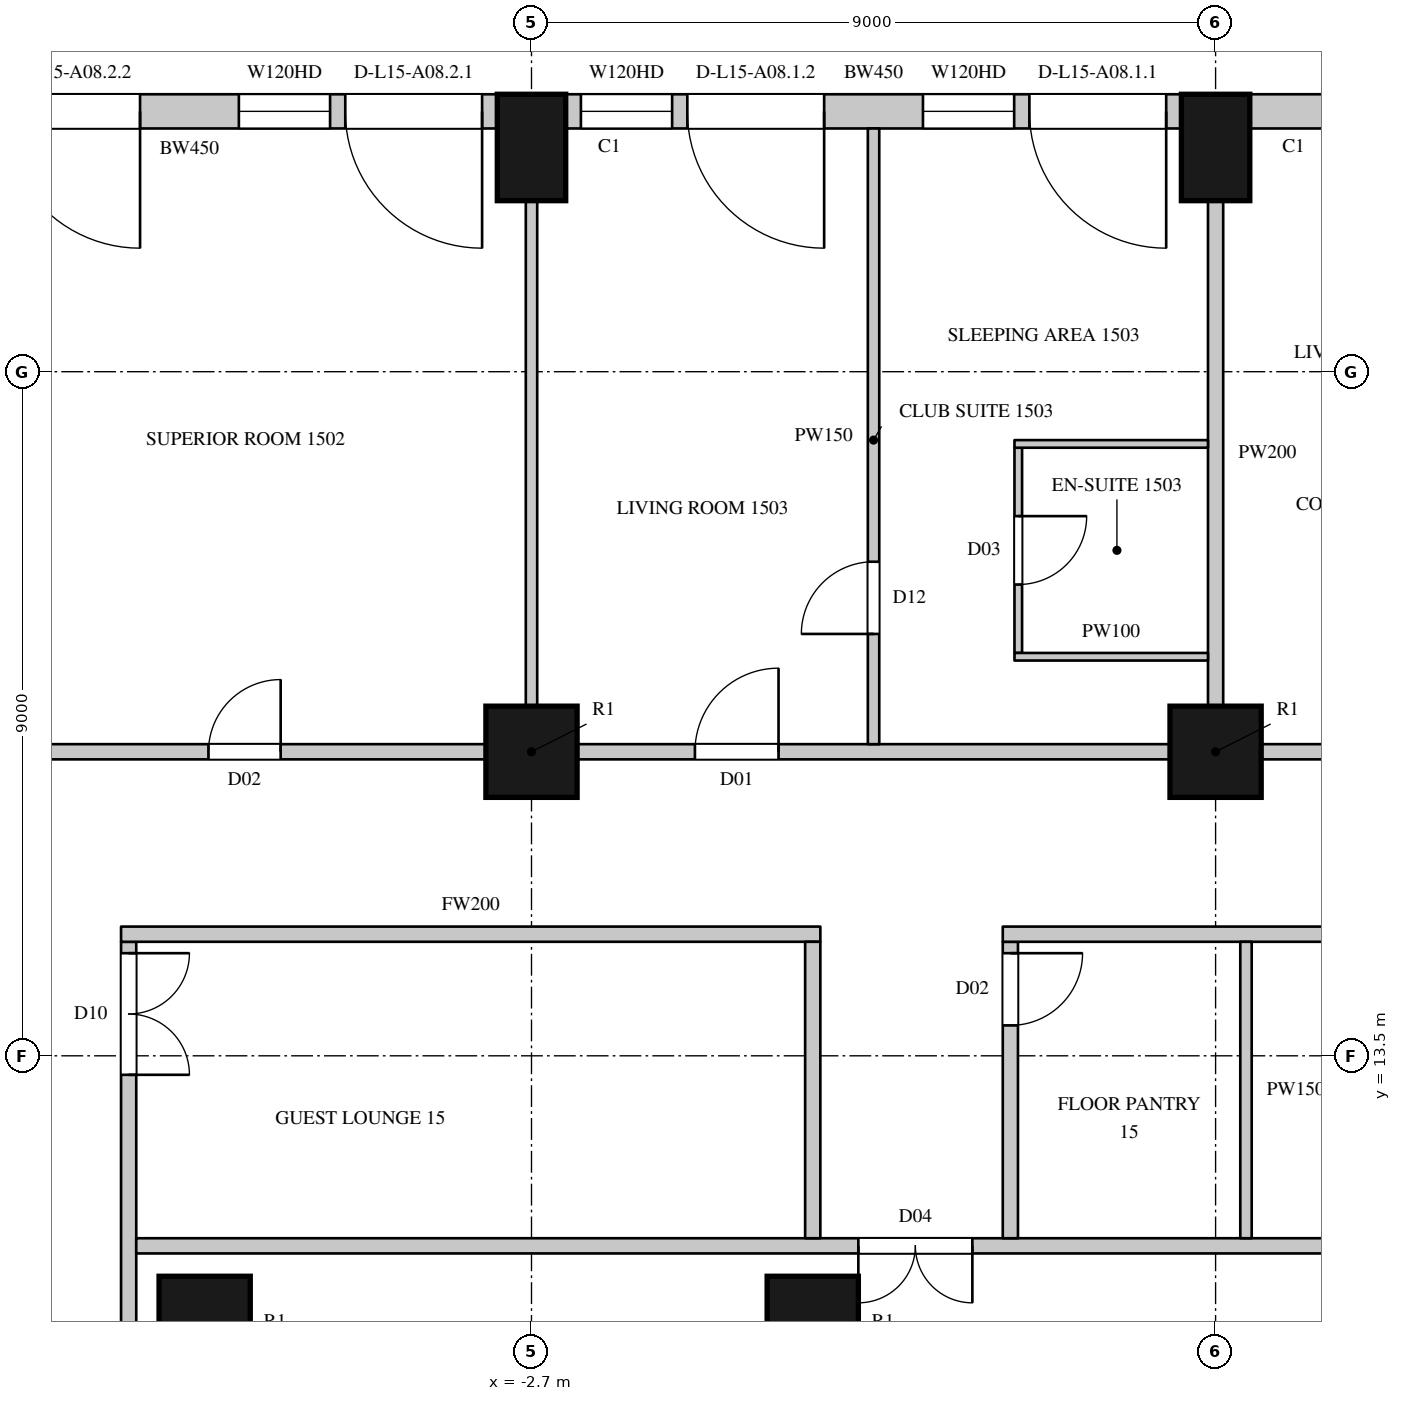
"""IFC4 building model, lengths in metres.
Left out: names, types, materials, properties, quantities, classifications, styles, units other than length and angle.
Written with IfcOpenShell. Run it as: python <this file> out.ifc"""

import sys

from ifc_helpers import new_model, si_unit, direction, frame, frame_2d, origin, origin_2d, place, context, subcontext, project, spatial, rectangle, circle, extrude, element, fill, save


model = new_model("IFC4")
c1 = context("Model", 3, precision=1e-05, world=origin(), true_north=direction((0.0, 1.0)))
c2 = subcontext(c1, "Body", "Model", "MODEL_VIEW")
j1 = project(units=[si_unit("LENGTHUNIT", "METRE"), si_unit("PLANEANGLEUNIT", "RADIAN")], contexts=[c1])
p1 = place(None, origin())
s1 = spatial("IfcSite", under=j1, at=p1, CompositionType="ELEMENT")
p2 = place(p1, origin())
s2 = spatial("IfcBuilding", under=s1, at=p2, CompositionType="ELEMENT")
p3 = place(p2, frame((0.0, 0.0, 84.3)))
s3 = spatial("IfcBuildingStorey", under=s2, at=p3, CompositionType="ELEMENT", Elevation=84.3)
for number, where, z_axis, x_axis in (
    (1, (6.3, 25.45, 0.0), (0.0, 0.0, 1.0), (-1.0, 0.0, 0.0)),
    (2, (-2.7, 25.45, 0.0), (0.0, 0.0, 1.0), (-1.0, 0.0, 0.0)),
):
    element("IfcColumn", number, at=place(p3, frame(where, z_axis=z_axis, x_axis=x_axis)), inside=s3, PredefinedType="COLUMN", context=c2, shape_type="SweptSolid", body=[
        extrude(rectangle(XDim=0.9, YDim=1.4, at=origin_2d()), origin(), (0.0, 0.0, 1.0), 3.6),
    ])
for number, where, z_axis, x_axis in (
    (3, (-2.7, 17.5, 0.0), (0.0, 0.0, 1.0), (1.0, 0.0, 0.0)),
    (4, (6.3, 17.5, 0.0), (0.0, 0.0, 1.0), (1.0, 0.0, 0.0)),
    (5, (-7.0, 10.0, 0.0), (0.0, 0.0, 1.0), (1.0, 0.0, 0.0)),
    (6, (1.0, 10.0, 0.0), (0.0, 0.0, 1.0), (1.0, 0.0, 0.0)),
):
    element("IfcColumn", number, at=place(p3, frame(where, z_axis=z_axis, x_axis=x_axis)), inside=s3, PredefinedType="COLUMN", context=c2, shape_type="SweptSolid", body=[
        extrude(circle(Radius=0.6, at=origin_2d()), origin(), (0.0, 0.0, 1.0), 3.6),
    ])
p4 = place(p3, frame((11.989, 25.925, 0.0), z_axis=(0.0, 0.0, 1.0), x_axis=(-1.0, 0.0, 0.0)))
e7 = element("IfcWall", 7, at=p4, inside=s3, PredefinedType="SOLIDWALL", context=c2, shape_type="SweptSolid", body=[
    extrude(rectangle(XDim=5.239, YDim=0.45, at=frame_2d((2.619, 0.0))), origin(), (0.0, 0.0, 1.0), 3.3),
])
p5 = place(p4, frame((1.77, 0.0, 1.05)))
e8 = element("IfcOpeningElement", 8, at=p5, cuts=e7, PredefinedType="OPENING", context=c2, shape_type="SweptSolid", body=[
    extrude(rectangle(XDim=2.1, YDim=2.0, at=frame_2d((1.05, 1.0))), frame((0.0, 0.235, 0.0), z_axis=(0.0, -1.0, 0.0), x_axis=(1.0, 0.0, 0.0)), (0.0, 0.0, 1.0), 0.47),
])
p6 = place(p3, frame((5.85, 25.925, 0.0), z_axis=(0.0, 0.0, 1.0), x_axis=(-1.0, 0.0, 0.0)))
e9 = element("IfcWall", 9, at=p6, inside=s3, PredefinedType="SOLIDWALL", context=c2, shape_type="SweptSolid", body=[
    extrude(rectangle(XDim=8.1, YDim=0.45, at=frame_2d((4.05, 0.0))), origin(), (0.0, 0.0, 1.0), 3.3),
])
p7 = place(p6, frame((0.2, 0.0, 0.0)))
e10 = element("IfcOpeningElement", 10, at=p7, cuts=e9, PredefinedType="OPENING", context=c2, shape_type="SweptSolid", body=[
    extrude(rectangle(XDim=1.8, YDim=2.4, at=frame_2d((0.9, 1.2))), frame((0.0, 0.235, 0.0), z_axis=(0.0, -1.0, 0.0), x_axis=(1.0, 0.0, 0.0)), (0.0, 0.0, 1.0), 0.47),
])
p8 = place(p6, frame((2.2, 0.0, 1.05)))
e11 = element("IfcOpeningElement", 11, at=p8, cuts=e9, PredefinedType="OPENING", context=c2, shape_type="SweptSolid", body=[
    extrude(rectangle(XDim=1.2, YDim=2.0, at=frame_2d((0.6, 1.0))), frame((0.0, 0.235, 0.0), z_axis=(0.0, -1.0, 0.0), x_axis=(1.0, 0.0, 0.0)), (0.0, 0.0, 1.0), 0.47),
])
p9 = place(p6, frame((4.7, 0.0, 0.0)))
e12 = element("IfcOpeningElement", 12, at=p9, cuts=e9, PredefinedType="OPENING", context=c2, shape_type="SweptSolid", body=[
    extrude(rectangle(XDim=1.8, YDim=2.4, at=frame_2d((0.9, 1.2))), frame((0.0, 0.235, 0.0), z_axis=(0.0, -1.0, 0.0), x_axis=(1.0, 0.0, 0.0)), (0.0, 0.0, 1.0), 0.47),
])
p10 = place(p6, frame((6.7, 0.0, 1.05)))
e13 = element("IfcOpeningElement", 13, at=p10, cuts=e9, PredefinedType="OPENING", context=c2, shape_type="SweptSolid", body=[
    extrude(rectangle(XDim=1.2, YDim=2.0, at=frame_2d((0.6, 1.0))), frame((0.0, 0.235, 0.0), z_axis=(0.0, -1.0, 0.0), x_axis=(1.0, 0.0, 0.0)), (0.0, 0.0, 1.0), 0.47),
])
p11 = place(p3, frame((-3.15, 25.925, 0.0), z_axis=(0.0, 0.0, 1.0), x_axis=(-1.0, 0.0, 0.0)))
e14 = element("IfcWall", 14, at=p11, inside=s3, PredefinedType="SOLIDWALL", context=c2, shape_type="SweptSolid", body=[
    extrude(rectangle(XDim=8.1, YDim=0.45, at=frame_2d((4.05, 0.0))), origin(), (0.0, 0.0, 1.0), 3.3),
])
p12 = place(p11, frame((0.2, 0.0, 0.0)))
e15 = element("IfcOpeningElement", 15, at=p12, cuts=e14, PredefinedType="OPENING", context=c2, shape_type="SweptSolid", body=[
    extrude(rectangle(XDim=1.8, YDim=2.4, at=frame_2d((0.9, 1.2))), frame((0.0, 0.235, 0.0), z_axis=(0.0, -1.0, 0.0), x_axis=(1.0, 0.0, 0.0)), (0.0, 0.0, 1.0), 0.47),
])
p13 = place(p11, frame((2.2, 0.0, 1.05)))
e16 = element("IfcOpeningElement", 16, at=p13, cuts=e14, PredefinedType="OPENING", context=c2, shape_type="SweptSolid", body=[
    extrude(rectangle(XDim=1.2, YDim=2.0, at=frame_2d((0.6, 1.0))), frame((0.0, 0.235, 0.0), z_axis=(0.0, -1.0, 0.0), x_axis=(1.0, 0.0, 0.0)), (0.0, 0.0, 1.0), 0.47),
])
p14 = place(p11, frame((4.7, 0.0, 0.0)))
e17 = element("IfcOpeningElement", 17, at=p14, cuts=e14, PredefinedType="OPENING", context=c2, shape_type="SweptSolid", body=[
    extrude(rectangle(XDim=1.8, YDim=2.4, at=frame_2d((0.9, 1.2))), frame((0.0, 0.235, 0.0), z_axis=(0.0, -1.0, 0.0), x_axis=(1.0, 0.0, 0.0)), (0.0, 0.0, 1.0), 0.47),
])
p15 = place(p11, frame((6.7, 0.0, 1.05)))
e18 = element("IfcOpeningElement", 18, at=p15, cuts=e14, PredefinedType="OPENING", context=c2, shape_type="SweptSolid", body=[
    extrude(rectangle(XDim=1.2, YDim=2.0, at=frame_2d((0.6, 1.0))), frame((0.0, 0.235, 0.0), z_axis=(0.0, -1.0, 0.0), x_axis=(1.0, 0.0, 0.0)), (0.0, 0.0, 1.0), 0.47),
])
p16 = place(p3, frame((-11.1, 17.5, 0.0), z_axis=(0.0, 0.0, 1.0), x_axis=(1.0, 0.0, 0.0)))
e19 = element("IfcWall", 19, at=p16, inside=s3, PredefinedType="PARTITIONING", context=c2, shape_type="SweptSolid", body=[
    extrude(rectangle(XDim=7.8, YDim=0.2, at=frame_2d((3.9, 0.0))), origin(), (0.0, 0.0, 1.0), 2.75),
])
p17 = place(p16, frame((4.15, 0.0, 0.0)))
e20 = element("IfcOpeningElement", 20, at=p17, cuts=e19, PredefinedType="OPENING", context=c2, shape_type="SweptSolid", body=[
    extrude(rectangle(XDim=0.95, YDim=2.2, at=frame_2d((0.475, 1.1))), frame((0.0, 0.11, 0.0), z_axis=(0.0, -1.0, 0.0), x_axis=(1.0, 0.0, 0.0)), (0.0, 0.0, 1.0), 0.22),
])
p18 = place(p3, frame((-2.1, 17.5, 0.0), z_axis=(0.0, 0.0, 1.0), x_axis=(1.0, 0.0, 0.0)))
e21 = element("IfcWall", 21, at=p18, inside=s3, PredefinedType="PARTITIONING", context=c2, shape_type="SweptSolid", body=[
    extrude(rectangle(XDim=7.8, YDim=0.2, at=frame_2d((3.9, 0.0))), origin(), (0.0, 0.0, 1.0), 2.75),
])
p19 = place(p18, frame((1.55, 0.0, 0.0)))
e22 = element("IfcOpeningElement", 22, at=p19, cuts=e21, PredefinedType="OPENING", context=c2, shape_type="SweptSolid", body=[
    extrude(rectangle(XDim=1.1, YDim=2.4, at=frame_2d((0.55, 1.2))), frame((0.0, 0.11, 0.0), z_axis=(0.0, -1.0, 0.0), x_axis=(1.0, 0.0, 0.0)), (0.0, 0.0, 1.0), 0.22),
])
p20 = place(p3, frame((6.9, 17.5, 0.0), z_axis=(0.0, 0.0, 1.0), x_axis=(1.0, 0.0, 0.0)))
e23 = element("IfcWall", 23, at=p20, inside=s3, PredefinedType="PARTITIONING", context=c2, shape_type="SweptSolid", body=[
    extrude(rectangle(XDim=7.8, YDim=0.2, at=frame_2d((3.9, 0.0))), origin(), (0.0, 0.0, 1.0), 2.75),
])
p21 = place(p20, frame((1.45, 0.0, 0.0)))
e24 = element("IfcOpeningElement", 24, at=p21, cuts=e23, PredefinedType="OPENING", context=c2, shape_type="SweptSolid", body=[
    extrude(rectangle(XDim=1.1, YDim=2.4, at=frame_2d((0.55, 1.2))), frame((0.0, 0.11, 0.0), z_axis=(0.0, -1.0, 0.0), x_axis=(1.0, 0.0, 0.0)), (0.0, 0.0, 1.0), 0.22),
])
p22 = place(p3, frame((-8.0, -10.9, 0.0), z_axis=(0.0, 0.0, 1.0), x_axis=(0.0, 1.0, 0.0)))
e25 = element("IfcWall", 25, at=p22, inside=s3, PredefinedType="PARTITIONING", context=c2, shape_type="SweptSolid", body=[
    extrude(rectangle(XDim=25.9, YDim=0.2, at=frame_2d((12.95, 0.0))), origin(), (0.0, 0.0, 1.0), 3.3),
])
p23 = place(p22, frame((14.65, 0.0, 0.0)))
e26 = element("IfcOpeningElement", 26, at=p23, cuts=e25, PredefinedType="OPENING", context=c2, shape_type="SweptSolid", body=[
    extrude(rectangle(XDim=1.5, YDim=2.2, at=frame_2d((0.75, 1.1))), frame((0.0, 0.11, 0.0), z_axis=(0.0, -1.0, 0.0), x_axis=(1.0, 0.0, 0.0)), (0.0, 0.0, 1.0), 0.22),
])
p24 = place(p22, frame((24.15, 0.0, 0.0)))
e27 = element("IfcOpeningElement", 27, at=p24, cuts=e25, PredefinedType="OPENING", context=c2, shape_type="SweptSolid", body=[
    extrude(rectangle(XDim=1.6, YDim=2.4, at=frame_2d((0.8, 1.2))), frame((0.0, 0.11, 0.0), z_axis=(0.0, -1.0, 0.0), x_axis=(1.0, 0.0, 0.0)), (0.0, 0.0, 1.0), 0.22),
])
p25 = place(p3, frame((-7.9, 11.0, 0.0), z_axis=(0.0, 0.0, 1.0), x_axis=(1.0, 0.0, 0.0)))
e28 = element("IfcWall", 28, at=p25, inside=s3, PredefinedType="PARTITIONING", context=c2, shape_type="SweptSolid", body=[
    extrude(rectangle(XDim=17.9, YDim=0.2, at=frame_2d((8.95, 0.0))), origin(), (0.0, 0.0, 1.0), 3.3),
])
p26 = place(p25, frame((9.5, 0.0, 0.0)))
e29 = element("IfcOpeningElement", 29, at=p26, cuts=e28, PredefinedType="OPENING", context=c2, shape_type="SweptSolid", body=[
    extrude(rectangle(XDim=1.5, YDim=2.2, at=frame_2d((0.75, 1.1))), frame((0.0, 0.11, 0.0), z_axis=(0.0, -1.0, 0.0), x_axis=(1.0, 0.0, 0.0)), (0.0, 0.0, 1.0), 0.22),
])
p27 = place(p3, frame((-8.1, 15.1, 0.0), z_axis=(0.0, 0.0, 1.0), x_axis=(1.0, 0.0, 0.0)))
e30 = element("IfcWall", 30, at=p27, inside=s3, PredefinedType="PARTITIONING", context=c2, shape_type="SweptSolid", body=[
    extrude(rectangle(XDim=9.2, YDim=0.2, at=frame_2d((4.6, 0.0))), origin(), (0.0, 0.0, 1.0), 3.3),
])
p28 = place(p3, frame((1.0, 11.1, 0.0), z_axis=(0.0, 0.0, 1.0), x_axis=(0.0, 1.0, 0.0)))
e31 = element("IfcWall", 31, at=p28, inside=s3, PredefinedType="PARTITIONING", context=c2, shape_type="SweptSolid", body=[
    extrude(rectangle(XDim=3.9, YDim=0.2, at=frame_2d((1.95, 0.0))), origin(), (0.0, 0.0, 1.0), 3.3),
])
p29 = place(p3, frame((3.6, 11.1, 0.0), z_axis=(0.0, 0.0, 1.0), x_axis=(0.0, 1.0, 0.0)))
e32 = element("IfcWall", 32, at=p29, inside=s3, PredefinedType="PARTITIONING", context=c2, shape_type="SweptSolid", body=[
    extrude(rectangle(XDim=3.9, YDim=0.2, at=frame_2d((1.95, 0.0))), origin(), (0.0, 0.0, 1.0), 3.3),
])
p30 = place(p29, frame((2.8, 0.0, 0.0)))
e33 = element("IfcOpeningElement", 33, at=p30, cuts=e32, PredefinedType="OPENING", context=c2, shape_type="SweptSolid", body=[
    extrude(rectangle(XDim=0.95, YDim=2.2, at=frame_2d((0.475, 1.1))), frame((0.0, 0.11, 0.0), z_axis=(0.0, -1.0, 0.0), x_axis=(1.0, 0.0, 0.0)), (0.0, 0.0, 1.0), 0.22),
])
p31 = place(p3, frame((3.5, 15.1, 0.0), z_axis=(0.0, 0.0, 1.0), x_axis=(1.0, 0.0, 0.0)))
e34 = element("IfcWall", 34, at=p31, inside=s3, PredefinedType="PARTITIONING", context=c2, shape_type="SweptSolid", body=[
    extrude(rectangle(XDim=10.3, YDim=0.2, at=frame_2d((5.15, 0.0))), origin(), (0.0, 0.0, 1.0), 3.3),
])
p32 = place(p31, frame((6.2, 0.0, 0.0)))
e35 = element("IfcOpeningElement", 35, at=p32, cuts=e34, PredefinedType="OPENING", context=c2, shape_type="SweptSolid", body=[
    extrude(rectangle(XDim=0.95, YDim=2.2, at=frame_2d((0.475, 1.1))), frame((0.0, 0.11, 0.0), z_axis=(0.0, -1.0, 0.0), x_axis=(1.0, 0.0, 0.0)), (0.0, 0.0, 1.0), 0.22),
])
p33 = place(p3, frame((-2.7, 18.1, 0.0), z_axis=(0.0, 0.0, 1.0), x_axis=(0.0, 1.0, 0.0)))
e36 = element("IfcWall", 36, at=p33, inside=s3, PredefinedType="PARTITIONING", context=c2, shape_type="SweptSolid", body=[
    extrude(rectangle(XDim=6.65, YDim=0.15, at=frame_2d((3.325, 0.0))), origin(), (0.0, 0.0, 1.0), 2.75),
])
p34 = place(p3, frame((1.8, 17.6, 0.0), z_axis=(0.0, 0.0, 1.0), x_axis=(0.0, 1.0, 0.0)))
e37 = element("IfcWall", 37, at=p34, inside=s3, PredefinedType="PARTITIONING", context=c2, shape_type="SweptSolid", body=[
    extrude(rectangle(XDim=8.1, YDim=0.15, at=frame_2d((4.05, 0.0))), origin(), (0.0, 0.0, 1.0), 2.65),
])
p35 = place(p34, frame((1.45, 0.0, 0.0)))
e38 = element("IfcOpeningElement", 38, at=p35, cuts=e37, PredefinedType="OPENING", context=c2, shape_type="SweptSolid", body=[
    extrude(rectangle(XDim=0.95, YDim=2.2, at=frame_2d((0.475, 1.1))), frame((0.0, 0.085, 0.0), z_axis=(0.0, -1.0, 0.0), x_axis=(1.0, 0.0, 0.0)), (0.0, 0.0, 1.0), 0.17),
])
p36 = place(p3, frame((6.7, 11.1, 0.0), z_axis=(0.0, 0.0, 1.0), x_axis=(0.0, 1.0, 0.0)))
e39 = element("IfcWall", 39, at=p36, inside=s3, PredefinedType="PARTITIONING", context=c2, shape_type="SweptSolid", body=[
    extrude(rectangle(XDim=3.9, YDim=0.15, at=frame_2d((1.95, 0.0))), origin(), (0.0, 0.0, 1.0), 3.3),
])
p37 = place(p3, frame((6.3, 18.1, 0.0), z_axis=(0.0, 0.0, 1.0), x_axis=(0.0, 1.0, 0.0)))
e40 = element("IfcWall", 40, at=p37, inside=s3, PredefinedType="PARTITIONING", context=c2, shape_type="SweptSolid", body=[
    extrude(rectangle(XDim=6.65, YDim=0.2, at=frame_2d((3.325, 0.0))), origin(), (0.0, 0.0, 1.0), 2.75),
])
p38 = place(p3, frame((3.704, 18.8, 0.0), z_axis=(0.0, 0.0, 1.0), x_axis=(0.0, 1.0, 0.0)))
e41 = element("IfcWall", 41, at=p38, inside=s3, PredefinedType="PARTITIONING", context=c2, shape_type="SweptSolid", body=[
    extrude(rectangle(XDim=2.7, YDim=0.1, at=frame_2d((1.35, 0.0))), origin(), (0.0, 0.0, 1.0), 3.3),
])
p39 = place(p38, frame((0.9, 0.0, 0.0)))
e42 = element("IfcOpeningElement", 42, at=p39, cuts=e41, PredefinedType="OPENING", context=c2, shape_type="SweptSolid", body=[
    extrude(rectangle(XDim=0.9, YDim=2.2, at=frame_2d((0.45, 1.1))), frame((0.0, 0.06, 0.0), z_axis=(0.0, -1.0, 0.0), x_axis=(1.0, 0.0, 0.0)), (0.0, 0.0, 1.0), 0.12),
])
for number, where, z_axis, x_axis in (
    (43, (3.654, 18.75, 0.0), (0.0, 0.0, 1.0), (1.0, 0.0, 0.0)),
    (44, (3.654, 21.55, 0.0), (0.0, 0.0, 1.0), (1.0, 0.0, 0.0)),
):
    element("IfcWall", number, at=place(p3, frame(where, z_axis=z_axis, x_axis=x_axis)), inside=s3, PredefinedType="PARTITIONING", context=c2, shape_type="SweptSolid", body=[
        extrude(rectangle(XDim=2.546, YDim=0.1, at=frame_2d((1.273, 0.0))), origin(), (0.0, 0.0, 1.0), 3.3),
    ])
p40 = place(p7, origin())
e45 = element("IfcDoor", 45, at=p40, inside=s3, OperationType="SLIDING_TO_LEFT", PredefinedType="DOOR", context=c2, shape_type="SweptSolid", body=[
    extrude(rectangle(XDim=1.8, YDim=2.4, at=frame_2d((0.9, 1.2))), frame((0.0, 0.13, 0.0), z_axis=(0.0, -1.0, 0.0), x_axis=(1.0, 0.0, 0.0)), (0.0, 0.0, 1.0), 0.05),
])
fill(e10, e45)
p41 = place(p8, origin())
e46 = element("IfcWindow", 46, at=p41, inside=s3, PartitioningType="SINGLE_PANEL", PredefinedType="WINDOW", context=c2, shape_type="SweptSolid", body=[
    extrude(rectangle(XDim=1.2, YDim=2.0, at=frame_2d((0.6, 1.0))), frame((0.0, 0.135, 0.0), z_axis=(0.0, -1.0, 0.0), x_axis=(1.0, 0.0, 0.0)), (0.0, 0.0, 1.0), 0.06),
])
fill(e11, e46)
p42 = place(p9, origin())
e47 = element("IfcDoor", 47, at=p42, inside=s3, OperationType="SLIDING_TO_LEFT", PredefinedType="DOOR", context=c2, shape_type="SweptSolid", body=[
    extrude(rectangle(XDim=1.8, YDim=2.4, at=frame_2d((0.9, 1.2))), frame((0.0, 0.13, 0.0), z_axis=(0.0, -1.0, 0.0), x_axis=(1.0, 0.0, 0.0)), (0.0, 0.0, 1.0), 0.05),
])
fill(e12, e47)
p43 = place(p10, origin())
e48 = element("IfcWindow", 48, at=p43, inside=s3, PartitioningType="SINGLE_PANEL", PredefinedType="WINDOW", context=c2, shape_type="SweptSolid", body=[
    extrude(rectangle(XDim=1.2, YDim=2.0, at=frame_2d((0.6, 1.0))), frame((0.0, 0.135, 0.0), z_axis=(0.0, -1.0, 0.0), x_axis=(1.0, 0.0, 0.0)), (0.0, 0.0, 1.0), 0.06),
])
fill(e13, e48)
p44 = place(p12, origin())
e49 = element("IfcDoor", 49, at=p44, inside=s3, OperationType="SLIDING_TO_LEFT", PredefinedType="DOOR", context=c2, shape_type="SweptSolid", body=[
    extrude(rectangle(XDim=1.8, YDim=2.4, at=frame_2d((0.9, 1.2))), frame((0.0, 0.13, 0.0), z_axis=(0.0, -1.0, 0.0), x_axis=(1.0, 0.0, 0.0)), (0.0, 0.0, 1.0), 0.05),
])
fill(e15, e49)
p45 = place(p13, origin())
e50 = element("IfcWindow", 50, at=p45, inside=s3, PartitioningType="SINGLE_PANEL", PredefinedType="WINDOW", context=c2, shape_type="SweptSolid", body=[
    extrude(rectangle(XDim=1.2, YDim=2.0, at=frame_2d((0.6, 1.0))), frame((0.0, 0.135, 0.0), z_axis=(0.0, -1.0, 0.0), x_axis=(1.0, 0.0, 0.0)), (0.0, 0.0, 1.0), 0.06),
])
fill(e16, e50)
p46 = place(p14, origin())
e51 = element("IfcDoor", 51, at=p46, inside=s3, OperationType="SLIDING_TO_LEFT", PredefinedType="DOOR", context=c2, shape_type="SweptSolid", body=[
    extrude(rectangle(XDim=1.8, YDim=2.4, at=frame_2d((0.9, 1.2))), frame((0.0, 0.13, 0.0), z_axis=(0.0, -1.0, 0.0), x_axis=(1.0, 0.0, 0.0)), (0.0, 0.0, 1.0), 0.05),
])
fill(e17, e51)
p47 = place(p26, origin())
e52 = element("IfcDoor", 52, at=p47, inside=s3, OperationType="DOUBLE_DOOR_SINGLE_SWING", PredefinedType="DOOR", context=c2, shape_type="SweptSolid", body=[
    extrude(rectangle(XDim=1.5, YDim=2.2, at=frame_2d((0.75, 1.1))), frame((0.0, 0.025, 0.0), z_axis=(0.0, -1.0, 0.0), x_axis=(1.0, 0.0, 0.0)), (0.0, 0.0, 1.0), 0.05),
])
fill(e29, e52)
p48 = place(p24, origin())
e53 = element("IfcDoor", 53, at=p48, inside=s3, OperationType="DOUBLE_DOOR_SINGLE_SWING", PredefinedType="DOOR", context=c2, shape_type="SweptSolid", body=[
    extrude(rectangle(XDim=1.6, YDim=2.4, at=frame_2d((0.8, 1.2))), frame((0.0, 0.025, 0.0), z_axis=(0.0, -1.0, 0.0), x_axis=(1.0, 0.0, 0.0)), (0.0, 0.0, 1.0), 0.05),
])
fill(e27, e53)
p49 = place(p30, origin())
e54 = element("IfcDoor", 54, at=p49, inside=s3, OperationType="SINGLE_SWING_LEFT", PredefinedType="DOOR", context=c2, shape_type="SweptSolid", body=[
    extrude(rectangle(XDim=0.95, YDim=2.2, at=frame_2d((0.475, 1.1))), frame((0.0, 0.025, 0.0), z_axis=(0.0, -1.0, 0.0), x_axis=(1.0, 0.0, 0.0)), (0.0, 0.0, 1.0), 0.05),
])
fill(e33, e54)
p50 = place(p17, origin())
e55 = element("IfcDoor", 55, at=p50, inside=s3, OperationType="SINGLE_SWING_RIGHT", PredefinedType="DOOR", context=c2, shape_type="SweptSolid", body=[
    extrude(rectangle(XDim=0.95, YDim=2.2, at=frame_2d((0.475, 1.1))), frame((0.0, 0.025, 0.0), z_axis=(0.0, -1.0, 0.0), x_axis=(1.0, 0.0, 0.0)), (0.0, 0.0, 1.0), 0.05),
])
fill(e20, e55)
p51 = place(p19, origin())
e56 = element("IfcDoor", 56, at=p51, inside=s3, OperationType="SINGLE_SWING_RIGHT", PredefinedType="DOOR", context=c2, shape_type="SweptSolid", body=[
    extrude(rectangle(XDim=1.1, YDim=2.4, at=frame_2d((0.55, 1.2))), frame((0.0, 0.025, 0.0), z_axis=(0.0, -1.0, 0.0), x_axis=(1.0, 0.0, 0.0)), (0.0, 0.0, 1.0), 0.05),
])
fill(e22, e56)
p52 = place(p35, origin())
e57 = element("IfcDoor", 57, at=p52, inside=s3, OperationType="SINGLE_SWING_LEFT", PredefinedType="DOOR", context=c2, shape_type="SweptSolid", body=[
    extrude(rectangle(XDim=0.95, YDim=2.2, at=frame_2d((0.475, 1.1))), frame((0.0, 0.025, 0.0), z_axis=(0.0, -1.0, 0.0), x_axis=(1.0, 0.0, 0.0)), (0.0, 0.0, 1.0), 0.05),
])
fill(e38, e57)
p53 = place(p39, origin())
e58 = element("IfcDoor", 58, at=p53, inside=s3, OperationType="SINGLE_SWING_LEFT", PredefinedType="DOOR", context=c2, shape_type="SweptSolid", body=[
    extrude(rectangle(XDim=0.9, YDim=2.2, at=frame_2d((0.45, 1.1))), frame((0.0, 0.025, 0.0), z_axis=(0.0, -1.0, 0.0), x_axis=(1.0, 0.0, 0.0)), (0.0, 0.0, 1.0), 0.05),
])
fill(e42, e58)
save(model, sys.argv[1])
